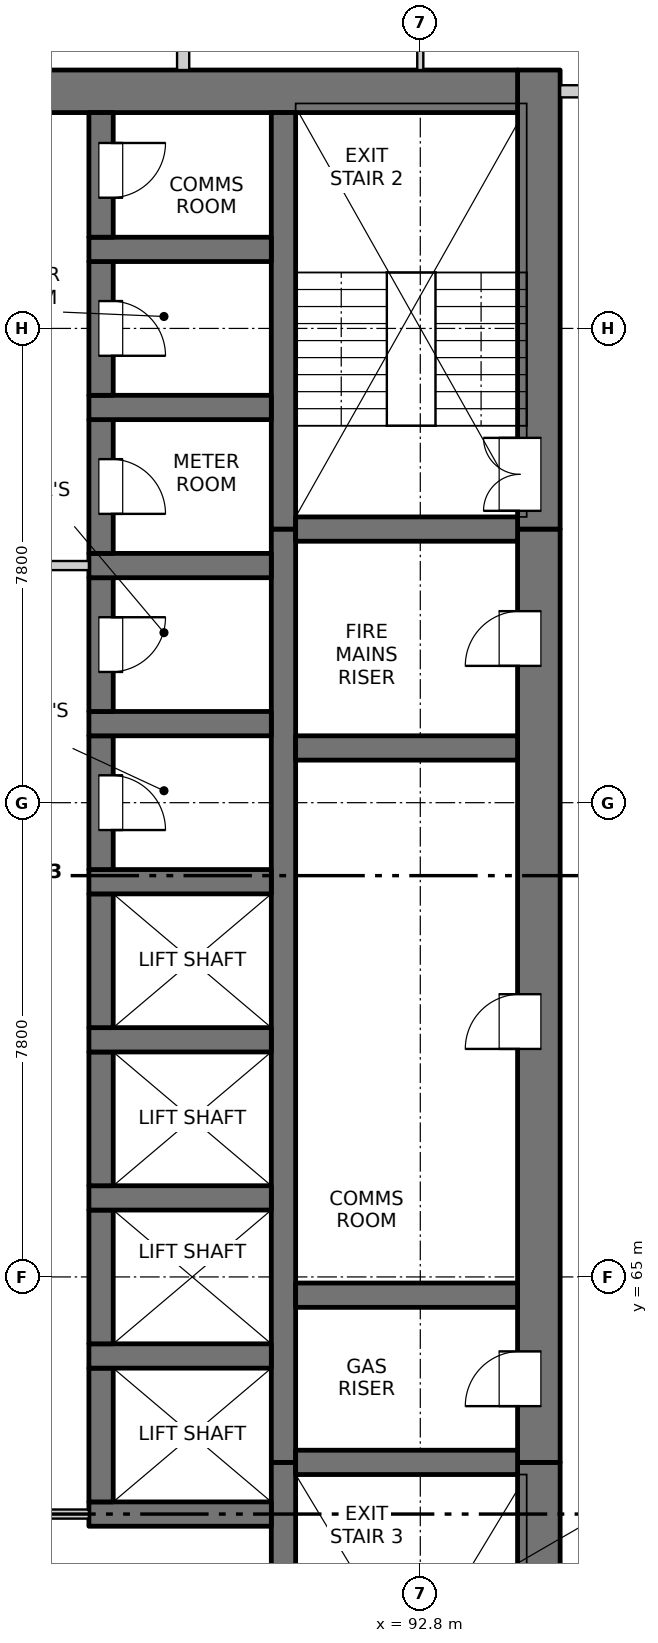
"""IFC4 building model, lengths in metres.
Left out: names, types, materials, properties, quantities, classifications, styles, units other than length and angle.
Written with IfcOpenShell. Run it as: python <this file> out.ifc"""

import sys

from ifc_helpers import new_model, si_unit, direction, frame, frame_2d, origin, place, context, subcontext, project, spatial, rectangle, extrude, element, fill, save


model = new_model("IFC4")
c1 = context("Model", 3, precision=1e-05, world=origin(), true_north=direction((0.0, 1.0)))
c2 = subcontext(c1, "Body", "Model", "MODEL_VIEW")
j1 = project(units=[si_unit("LENGTHUNIT", "METRE"), si_unit("PLANEANGLEUNIT", "RADIAN")], contexts=[c1])
p1 = place(None, origin())
s1 = spatial("IfcSite", under=j1, at=p1, CompositionType="ELEMENT")
p2 = place(p1, origin())
s2 = spatial("IfcBuilding", under=s1, at=p2, CompositionType="ELEMENT")
p3 = place(p2, frame((0.0, 0.0, 19.5)))
s3 = spatial("IfcBuildingStorey", under=s2, at=p3, CompositionType="ELEMENT", Elevation=19.5)
p4 = place(p3, frame((94.75, 54.9, -0.25), z_axis=(0.0, 0.0, 1.0), x_axis=(0.0, 1.0, 0.0)))
e1 = element("IfcWall", 1, at=p4, inside=s3, PredefinedType="SOLIDWALL", context=c2, shape_type="SweptSolid", body=[
    extrude(rectangle(XDim=7.05, YDim=0.7, at=frame_2d((3.525, 0.0))), origin(), (0.0, 0.0, 1.0), 3.4),
])
p5 = place(p4, frame((0.75, 0.0, 0.25)))
e2 = element("IfcOpeningElement", 2, at=p5, cuts=e1, PredefinedType="OPENING", context=c2, shape_type="SweptSolid", body=[
    extrude(rectangle(XDim=1.2, YDim=2.1, at=frame_2d((0.6, 1.05))), frame((0.0, 0.36, 0.0), z_axis=(0.0, -1.0, 0.0), x_axis=(1.0, 0.0, 0.0)), (0.0, 0.0, 1.0), 0.72),
])
p6 = place(p3, frame((94.75, 61.95, -0.25), z_axis=(0.0, 0.0, 1.0), x_axis=(0.0, 1.0, 0.0)))
e3 = element("IfcWall", 3, at=p6, inside=s3, PredefinedType="SOLIDWALL", context=c2, shape_type="SweptSolid", body=[
    extrude(rectangle(XDim=15.35, YDim=0.7, at=frame_2d((7.675, 0.0))), origin(), (0.0, 0.0, 1.0), 3.4),
])
p7 = place(p6, frame((0.925, 0.0, 0.25)))
e4 = element("IfcOpeningElement", 4, at=p7, cuts=e3, PredefinedType="OPENING", context=c2, shape_type="SweptSolid", body=[
    extrude(rectangle(XDim=0.9, YDim=2.1, at=frame_2d((0.45, 1.05))), frame((0.0, 0.36, 0.0), z_axis=(0.0, -1.0, 0.0), x_axis=(1.0, 0.0, 0.0)), (0.0, 0.0, 1.0), 0.72),
])
p8 = place(p6, frame((6.8, 0.0, 0.25)))
e5 = element("IfcOpeningElement", 5, at=p8, cuts=e3, PredefinedType="OPENING", context=c2, shape_type="SweptSolid", body=[
    extrude(rectangle(XDim=0.9, YDim=2.1, at=frame_2d((0.45, 1.05))), frame((0.0, 0.36, 0.0), z_axis=(0.0, -1.0, 0.0), x_axis=(1.0, 0.0, 0.0)), (0.0, 0.0, 1.0), 0.72),
])
p9 = place(p6, frame((13.1, 0.0, 0.25)))
e6 = element("IfcOpeningElement", 6, at=p9, cuts=e3, PredefinedType="OPENING", context=c2, shape_type="SweptSolid", body=[
    extrude(rectangle(XDim=0.9, YDim=2.1, at=frame_2d((0.45, 1.05))), frame((0.0, 0.36, 0.0), z_axis=(0.0, -1.0, 0.0), x_axis=(1.0, 0.0, 0.0)), (0.0, 0.0, 1.0), 0.72),
])
p10 = place(p3, frame((94.75, 77.3, -0.25), z_axis=(0.0, 0.0, 1.0), x_axis=(0.0, 1.0, 0.0)))
e7 = element("IfcWall", 7, at=p10, inside=s3, PredefinedType="SOLIDWALL", context=c2, shape_type="SweptSolid", body=[
    extrude(rectangle(XDim=7.55, YDim=0.7, at=frame_2d((3.775, 0.0))), origin(), (0.0, 0.0, 1.0), 3.4),
])
p11 = place(p10, frame((0.3, 0.0, 0.25)))
e8 = element("IfcOpeningElement", 8, at=p11, cuts=e7, PredefinedType="OPENING", context=c2, shape_type="SweptSolid", body=[
    extrude(rectangle(XDim=1.2, YDim=2.1, at=frame_2d((0.6, 1.05))), frame((0.0, 0.36, 0.0), z_axis=(0.0, -1.0, 0.0), x_axis=(1.0, 0.0, 0.0)), (0.0, 0.0, 1.0), 0.72),
])
p12 = place(p3, frame((75.6, 84.5, -0.25), z_axis=(0.0, 0.0, 1.0), x_axis=(1.0, 0.0, 0.0)))
e9 = element("IfcWall", 9, at=p12, inside=s3, PredefinedType="SOLIDWALL", context=c2, shape_type="SweptSolid", body=[
    extrude(rectangle(XDim=18.8, YDim=0.7, at=frame_2d((9.4, 0.0))), origin(), (0.0, 0.0, 1.0), 3.4),
])
p13 = place(p3, frame((90.55, 55.6, -0.25), z_axis=(0.0, 0.0, 1.0), x_axis=(0.0, 1.0, 0.0)))
e10 = element("IfcWall", 10, at=p13, inside=s3, PredefinedType="SOLIDWALL", context=c2, shape_type="SweptSolid", body=[
    extrude(rectangle(XDim=6.35, YDim=0.4, at=frame_2d((3.175, 0.0))), origin(), (0.0, 0.0, 1.0), 3.4),
])
p14 = place(p3, frame((90.55, 61.95, -0.25), z_axis=(0.0, 0.0, 1.0), x_axis=(0.0, 1.0, 0.0)))
e11 = element("IfcWall", 11, at=p14, inside=s3, PredefinedType="SOLIDWALL", context=c2, shape_type="SweptSolid", body=[
    extrude(rectangle(XDim=15.35, YDim=0.4, at=frame_2d((7.675, 0.0))), origin(), (0.0, 0.0, 1.0), 3.4),
])
p15 = place(p3, frame((90.55, 77.3, -0.25), z_axis=(0.0, 0.0, 1.0), x_axis=(0.0, 1.0, 0.0)))
e12 = element("IfcWall", 12, at=p15, inside=s3, PredefinedType="SOLIDWALL", context=c2, shape_type="SweptSolid", body=[
    extrude(rectangle(XDim=6.85, YDim=0.4, at=frame_2d((3.425, 0.0))), origin(), (0.0, 0.0, 1.0), 3.4),
])
p16 = place(p3, frame((87.35, 61.1, -0.25), z_axis=(0.0, 0.0, 1.0), x_axis=(1.0, 0.0, 0.0)))
e13 = element("IfcWall", 13, at=p16, inside=s3, PredefinedType="SOLIDWALL", context=c2, shape_type="SweptSolid", body=[
    extrude(rectangle(XDim=3.0, YDim=0.4, at=frame_2d((1.5, 0.0))), origin(), (0.0, 0.0, 1.0), 3.4),
])
p17 = place(p3, frame((87.55, 61.3, -0.25), z_axis=(0.0, 0.0, 1.0), x_axis=(0.0, 1.0, 0.0)))
e14 = element("IfcWall", 14, at=p17, inside=s3, PredefinedType="SOLIDWALL", context=c2, shape_type="SweptSolid", body=[
    extrude(rectangle(XDim=2.2, YDim=0.4, at=frame_2d((1.1, 0.0))), origin(), (0.0, 0.0, 1.0), 3.4),
])
p18 = place(p3, frame((87.35, 63.7, -0.25), z_axis=(0.0, 0.0, 1.0), x_axis=(1.0, 0.0, 0.0)))
e15 = element("IfcWall", 15, at=p18, inside=s3, PredefinedType="SOLIDWALL", context=c2, shape_type="SweptSolid", body=[
    extrude(rectangle(XDim=3.0, YDim=0.4, at=frame_2d((1.5, 0.0))), origin(), (0.0, 0.0, 1.0), 3.4),
])
p19 = place(p3, frame((87.55, 63.9, -0.25), z_axis=(0.0, 0.0, 1.0), x_axis=(0.0, 1.0, 0.0)))
e16 = element("IfcWall", 16, at=p19, inside=s3, PredefinedType="SOLIDWALL", context=c2, shape_type="SweptSolid", body=[
    extrude(rectangle(XDim=2.2, YDim=0.4, at=frame_2d((1.1, 0.0))), origin(), (0.0, 0.0, 1.0), 3.4),
])
p20 = place(p3, frame((87.35, 66.3, -0.25), z_axis=(0.0, 0.0, 1.0), x_axis=(1.0, 0.0, 0.0)))
e17 = element("IfcWall", 17, at=p20, inside=s3, PredefinedType="SOLIDWALL", context=c2, shape_type="SweptSolid", body=[
    extrude(rectangle(XDim=3.0, YDim=0.4, at=frame_2d((1.5, 0.0))), origin(), (0.0, 0.0, 1.0), 3.4),
])
p21 = place(p3, frame((87.55, 66.5, -0.25), z_axis=(0.0, 0.0, 1.0), x_axis=(0.0, 1.0, 0.0)))
e18 = element("IfcWall", 18, at=p21, inside=s3, PredefinedType="SOLIDWALL", context=c2, shape_type="SweptSolid", body=[
    extrude(rectangle(XDim=2.2, YDim=0.4, at=frame_2d((1.1, 0.0))), origin(), (0.0, 0.0, 1.0), 3.4),
])
p22 = place(p3, frame((87.35, 68.9, -0.25), z_axis=(0.0, 0.0, 1.0), x_axis=(1.0, 0.0, 0.0)))
e19 = element("IfcWall", 19, at=p22, inside=s3, PredefinedType="SOLIDWALL", context=c2, shape_type="SweptSolid", body=[
    extrude(rectangle(XDim=3.0, YDim=0.4, at=frame_2d((1.5, 0.0))), origin(), (0.0, 0.0, 1.0), 3.4),
])
p23 = place(p3, frame((87.55, 69.1, -0.25), z_axis=(0.0, 0.0, 1.0), x_axis=(0.0, 1.0, 0.0)))
e20 = element("IfcWall", 20, at=p23, inside=s3, PredefinedType="SOLIDWALL", context=c2, shape_type="SweptSolid", body=[
    extrude(rectangle(XDim=2.2, YDim=0.4, at=frame_2d((1.1, 0.0))), origin(), (0.0, 0.0, 1.0), 3.4),
])
p24 = place(p3, frame((87.35, 71.5, -0.25), z_axis=(0.0, 0.0, 1.0), x_axis=(1.0, 0.0, 0.0)))
e21 = element("IfcWall", 21, at=p24, inside=s3, PredefinedType="SOLIDWALL", context=c2, shape_type="SweptSolid", body=[
    extrude(rectangle(XDim=3.0, YDim=0.4, at=frame_2d((1.5, 0.0))), origin(), (0.0, 0.0, 1.0), 3.4),
])
p25 = place(p3, frame((87.55, 71.7, -0.25), z_axis=(0.0, 0.0, 1.0), x_axis=(0.0, 1.0, 0.0)))
e22 = element("IfcWall", 22, at=p25, inside=s3, PredefinedType="SOLIDWALL", context=c2, shape_type="SweptSolid", body=[
    extrude(rectangle(XDim=2.2, YDim=0.4, at=frame_2d((1.1, 0.0))), origin(), (0.0, 0.0, 1.0), 3.4),
])
p26 = place(p25, frame((0.65, 0.0, 0.25)))
e23 = element("IfcOpeningElement", 23, at=p26, cuts=e22, PredefinedType="OPENING", context=c2, shape_type="SweptSolid", body=[
    extrude(rectangle(XDim=0.9, YDim=2.1, at=frame_2d((0.45, 1.05))), frame((0.0, 0.21, 0.0), z_axis=(0.0, -1.0, 0.0), x_axis=(1.0, 0.0, 0.0)), (0.0, 0.0, 1.0), 0.42),
])
p27 = place(p3, frame((87.35, 74.1, -0.25), z_axis=(0.0, 0.0, 1.0), x_axis=(1.0, 0.0, 0.0)))
e24 = element("IfcWall", 24, at=p27, inside=s3, PredefinedType="SOLIDWALL", context=c2, shape_type="SweptSolid", body=[
    extrude(rectangle(XDim=3.0, YDim=0.4, at=frame_2d((1.5, 0.0))), origin(), (0.0, 0.0, 1.0), 3.4),
])
p28 = place(p3, frame((87.55, 74.3, -0.25), z_axis=(0.0, 0.0, 1.0), x_axis=(0.0, 1.0, 0.0)))
e25 = element("IfcWall", 25, at=p28, inside=s3, PredefinedType="SOLIDWALL", context=c2, shape_type="SweptSolid", body=[
    extrude(rectangle(XDim=2.2, YDim=0.4, at=frame_2d((1.1, 0.0))), origin(), (0.0, 0.0, 1.0), 3.4),
])
p29 = place(p28, frame((0.65, 0.0, 0.25)))
e26 = element("IfcOpeningElement", 26, at=p29, cuts=e25, PredefinedType="OPENING", context=c2, shape_type="SweptSolid", body=[
    extrude(rectangle(XDim=0.9, YDim=2.1, at=frame_2d((0.45, 1.05))), frame((0.0, 0.21, 0.0), z_axis=(0.0, -1.0, 0.0), x_axis=(1.0, 0.0, 0.0)), (0.0, 0.0, 1.0), 0.42),
])
p30 = place(p3, frame((87.35, 76.7, -0.25), z_axis=(0.0, 0.0, 1.0), x_axis=(1.0, 0.0, 0.0)))
e27 = element("IfcWall", 27, at=p30, inside=s3, PredefinedType="SOLIDWALL", context=c2, shape_type="SweptSolid", body=[
    extrude(rectangle(XDim=3.0, YDim=0.4, at=frame_2d((1.5, 0.0))), origin(), (0.0, 0.0, 1.0), 3.4),
])
p31 = place(p3, frame((87.55, 76.9, -0.25), z_axis=(0.0, 0.0, 1.0), x_axis=(0.0, 1.0, 0.0)))
e28 = element("IfcWall", 28, at=p31, inside=s3, PredefinedType="SOLIDWALL", context=c2, shape_type="SweptSolid", body=[
    extrude(rectangle(XDim=2.2, YDim=0.4, at=frame_2d((1.1, 0.0))), origin(), (0.0, 0.0, 1.0), 3.4),
])
p32 = place(p31, frame((0.65, 0.0, 0.25)))
e29 = element("IfcOpeningElement", 29, at=p32, cuts=e28, PredefinedType="OPENING", context=c2, shape_type="SweptSolid", body=[
    extrude(rectangle(XDim=0.9, YDim=2.1, at=frame_2d((0.45, 1.05))), frame((0.0, 0.21, 0.0), z_axis=(0.0, -1.0, 0.0), x_axis=(1.0, 0.0, 0.0)), (0.0, 0.0, 1.0), 0.42),
])
p33 = place(p3, frame((87.35, 79.3, -0.25), z_axis=(0.0, 0.0, 1.0), x_axis=(1.0, 0.0, 0.0)))
e30 = element("IfcWall", 30, at=p33, inside=s3, PredefinedType="SOLIDWALL", context=c2, shape_type="SweptSolid", body=[
    extrude(rectangle(XDim=3.0, YDim=0.4, at=frame_2d((1.5, 0.0))), origin(), (0.0, 0.0, 1.0), 3.4),
])
p34 = place(p3, frame((87.55, 79.5, -0.25), z_axis=(0.0, 0.0, 1.0), x_axis=(0.0, 1.0, 0.0)))
e31 = element("IfcWall", 31, at=p34, inside=s3, PredefinedType="SOLIDWALL", context=c2, shape_type="SweptSolid", body=[
    extrude(rectangle(XDim=2.2, YDim=0.4, at=frame_2d((1.1, 0.0))), origin(), (0.0, 0.0, 1.0), 3.4),
])
p35 = place(p34, frame((0.65, 0.0, 0.25)))
e32 = element("IfcOpeningElement", 32, at=p35, cuts=e31, PredefinedType="OPENING", context=c2, shape_type="SweptSolid", body=[
    extrude(rectangle(XDim=0.9, YDim=2.1, at=frame_2d((0.45, 1.05))), frame((0.0, 0.21, 0.0), z_axis=(0.0, -1.0, 0.0), x_axis=(1.0, 0.0, 0.0)), (0.0, 0.0, 1.0), 0.42),
])
p36 = place(p3, frame((87.35, 81.9, -0.25), z_axis=(0.0, 0.0, 1.0), x_axis=(1.0, 0.0, 0.0)))
e33 = element("IfcWall", 33, at=p36, inside=s3, PredefinedType="SOLIDWALL", context=c2, shape_type="SweptSolid", body=[
    extrude(rectangle(XDim=3.0, YDim=0.4, at=frame_2d((1.5, 0.0))), origin(), (0.0, 0.0, 1.0), 3.4),
])
p37 = place(p3, frame((87.55, 82.1, -0.25), z_axis=(0.0, 0.0, 1.0), x_axis=(0.0, 1.0, 0.0)))
e34 = element("IfcWall", 34, at=p37, inside=s3, PredefinedType="SOLIDWALL", context=c2, shape_type="SweptSolid", body=[
    extrude(rectangle(XDim=2.05, YDim=0.4, at=frame_2d((1.025, 0.0))), origin(), (0.0, 0.0, 1.0), 3.4),
])
p38 = place(p37, frame((0.65, 0.0, 0.25)))
e35 = element("IfcOpeningElement", 35, at=p38, cuts=e34, PredefinedType="OPENING", context=c2, shape_type="SweptSolid", body=[
    extrude(rectangle(XDim=0.9, YDim=2.1, at=frame_2d((0.45, 1.05))), frame((0.0, 0.21, 0.0), z_axis=(0.0, -1.0, 0.0), x_axis=(1.0, 0.0, 0.0)), (0.0, 0.0, 1.0), 0.42),
])
for number, where, z_axis, x_axis in (
    (36, (90.75, 61.95, -0.25), (0.0, 0.0, 1.0), (1.0, 0.0, 0.0)),
    (37, (90.75, 64.7, -0.25), (0.0, 0.0, 1.0), (1.0, 0.0, 0.0)),
    (38, (90.75, 73.7, -0.25), (0.0, 0.0, 1.0), (1.0, 0.0, 0.0)),
    (39, (90.75, 77.3, -0.25), (0.0, 0.0, 1.0), (1.0, 0.0, 0.0)),
):
    element("IfcWall", number, at=place(p3, frame(where, z_axis=z_axis, x_axis=x_axis)), inside=s3, PredefinedType="SOLIDWALL", context=c2, shape_type="SweptSolid", body=[
        extrude(rectangle(XDim=3.65, YDim=0.4, at=frame_2d((1.825, 0.0))), origin(), (0.0, 0.0, 1.0), 3.4),
    ])
p39 = place(p3, frame((82.65, 61.1, 0.0), z_axis=(0.0, 0.0, 1.0), x_axis=(1.0, 0.0, 0.0)))
e40 = element("IfcWall", 40, at=p39, inside=s3, PredefinedType="PARTITIONING", context=c2, shape_type="SweptSolid", body=[
    extrude(rectangle(XDim=4.7, YDim=0.15, at=frame_2d((2.35, 0.0))), origin(), (0.0, 0.0, 1.0), 3.15),
])
p40 = place(p39, frame((1.45, 0.0, 0.0)))
e41 = element("IfcOpeningElement", 41, at=p40, cuts=e40, PredefinedType="OPENING", context=c2, shape_type="SweptSolid", body=[
    extrude(rectangle(XDim=1.8, YDim=2.1, at=frame_2d((0.9, 1.05))), frame((0.0, 0.085, 0.0), z_axis=(0.0, -1.0, 0.0), x_axis=(1.0, 0.0, 0.0)), (0.0, 0.0, 1.0), 0.17),
])
p41 = place(p3, frame((82.65, 76.7, 0.0), z_axis=(0.0, 0.0, 1.0), x_axis=(1.0, 0.0, 0.0)))
e42 = element("IfcWall", 42, at=p41, inside=s3, PredefinedType="PARTITIONING", context=c2, shape_type="SweptSolid", body=[
    extrude(rectangle(XDim=4.7, YDim=0.15, at=frame_2d((2.35, 0.0))), origin(), (0.0, 0.0, 1.0), 3.15),
])
p42 = place(p41, frame((1.45, 0.0, 0.0)))
e43 = element("IfcOpeningElement", 43, at=p42, cuts=e42, PredefinedType="OPENING", context=c2, shape_type="SweptSolid", body=[
    extrude(rectangle(XDim=1.8, YDim=2.1, at=frame_2d((0.9, 1.05))), frame((0.0, 0.085, 0.0), z_axis=(0.0, -1.0, 0.0), x_axis=(1.0, 0.0, 0.0)), (0.0, 0.0, 1.0), 0.17),
])
p43 = place(p3, frame((95.1, 84.5, 0.0), z_axis=(0.0, 0.0, 1.0), x_axis=(1.0, 0.0, 0.0)))
e44 = element("IfcWall", 44, at=p43, inside=s3, PredefinedType="PARTITIONING", context=c2, shape_type="SweptSolid", body=[
    extrude(rectangle(XDim=1.7, YDim=0.2, at=frame_2d((0.85, 0.0))), origin(), (0.0, 0.0, 1.0), 3.15),
])
p44 = place(p3, frame((88.9, 84.85, 0.0), z_axis=(0.0, 0.0, 1.0), x_axis=(0.0, 1.0, 0.0)))
e45 = element("IfcWall", 45, at=p44, inside=s3, PredefinedType="PARTITIONING", context=c2, shape_type="SweptSolid", body=[
    extrude(rectangle(XDim=3.25, YDim=0.2, at=frame_2d((1.625, 0.0))), origin(), (0.0, 0.0, 1.0), 3.15),
])
p45 = place(p3, frame((92.8, 84.85, 0.0), z_axis=(0.0, 0.0, 1.0), x_axis=(0.0, 1.0, 0.0)))
e46 = element("IfcWall", 46, at=p45, inside=s3, PredefinedType="PARTITIONING", context=c2, shape_type="SweptSolid", body=[
    extrude(rectangle(XDim=3.25, YDim=0.1, at=frame_2d((1.625, 0.0))), origin(), (0.0, 0.0, 1.0), 3.15),
])
p46 = place(p45, frame((1.15, 0.0, 0.0)))
e47 = element("IfcOpeningElement", 47, at=p46, cuts=e46, PredefinedType="OPENING", context=c2, shape_type="SweptSolid", body=[
    extrude(rectangle(XDim=0.9, YDim=2.1, at=frame_2d((0.45, 1.05))), frame((0.0, 0.06, 0.0), z_axis=(0.0, -1.0, 0.0), x_axis=(1.0, 0.0, 0.0)), (0.0, 0.0, 1.0), 0.12),
])
p47 = place(p7, origin())
e48 = element("IfcDoor", 48, at=p47, inside=s3, OperationType="SINGLE_SWING_LEFT", PredefinedType="DOOR", context=c2, shape_type="SweptSolid", body=[
    extrude(rectangle(XDim=0.9, YDim=2.1, at=frame_2d((0.45, 1.05))), frame((0.0, 0.335, 0.0), z_axis=(0.0, -1.0, 0.0), x_axis=(1.0, 0.0, 0.0)), (0.0, 0.0, 1.0), 0.05),
])
fill(e4, e48)
p48 = place(p8, origin())
e49 = element("IfcDoor", 49, at=p48, inside=s3, OperationType="SINGLE_SWING_LEFT", PredefinedType="DOOR", context=c2, shape_type="SweptSolid", body=[
    extrude(rectangle(XDim=0.9, YDim=2.1, at=frame_2d((0.45, 1.05))), frame((0.0, 0.335, 0.0), z_axis=(0.0, -1.0, 0.0), x_axis=(1.0, 0.0, 0.0)), (0.0, 0.0, 1.0), 0.05),
])
fill(e5, e49)
p49 = place(p26, origin())
e50 = element("IfcDoor", 50, at=p49, inside=s3, OperationType="SINGLE_SWING_RIGHT", PredefinedType="DOOR", context=c2, shape_type="SweptSolid", body=[
    extrude(rectangle(XDim=0.9, YDim=2.1, at=frame_2d((0.45, 1.05))), frame((0.0, -0.135, 0.0), z_axis=(0.0, -1.0, 0.0), x_axis=(1.0, 0.0, 0.0)), (0.0, 0.0, 1.0), 0.05),
])
fill(e23, e50)
p50 = place(p29, origin())
e51 = element("IfcDoor", 51, at=p50, inside=s3, OperationType="SINGLE_SWING_LEFT", PredefinedType="DOOR", context=c2, shape_type="SweptSolid", body=[
    extrude(rectangle(XDim=0.9, YDim=2.1, at=frame_2d((0.45, 1.05))), frame((0.0, -0.135, 0.0), z_axis=(0.0, -1.0, 0.0), x_axis=(1.0, 0.0, 0.0)), (0.0, 0.0, 1.0), 0.05),
])
fill(e26, e51)
p51 = place(p9, origin())
e52 = element("IfcDoor", 52, at=p51, inside=s3, OperationType="SINGLE_SWING_LEFT", PredefinedType="DOOR", context=c2, shape_type="SweptSolid", body=[
    extrude(rectangle(XDim=0.9, YDim=2.1, at=frame_2d((0.45, 1.05))), frame((0.0, 0.335, 0.0), z_axis=(0.0, -1.0, 0.0), x_axis=(1.0, 0.0, 0.0)), (0.0, 0.0, 1.0), 0.05),
])
fill(e6, e52)
p52 = place(p32, origin())
e53 = element("IfcDoor", 53, at=p52, inside=s3, OperationType="SINGLE_SWING_RIGHT", PredefinedType="DOOR", context=c2, shape_type="SweptSolid", body=[
    extrude(rectangle(XDim=0.9, YDim=2.1, at=frame_2d((0.45, 1.05))), frame((0.0, -0.135, 0.0), z_axis=(0.0, -1.0, 0.0), x_axis=(1.0, 0.0, 0.0)), (0.0, 0.0, 1.0), 0.05),
])
fill(e29, e53)
p53 = place(p11, origin())
e54 = element("IfcDoor", 54, at=p53, inside=s3, OperationType="DOUBLE_DOOR_SINGLE_SWING", PredefinedType="DOOR", context=c2, shape_type="SweptSolid", body=[
    extrude(rectangle(XDim=1.2, YDim=2.1, at=frame_2d((0.6, 1.05))), frame((0.0, 0.335, 0.0), z_axis=(0.0, -1.0, 0.0), x_axis=(1.0, 0.0, 0.0)), (0.0, 0.0, 1.0), 0.05),
])
fill(e8, e54)
p54 = place(p35, origin())
e55 = element("IfcDoor", 55, at=p54, inside=s3, OperationType="SINGLE_SWING_RIGHT", PredefinedType="DOOR", context=c2, shape_type="SweptSolid", body=[
    extrude(rectangle(XDim=0.9, YDim=2.1, at=frame_2d((0.45, 1.05))), frame((0.0, -0.135, 0.0), z_axis=(0.0, -1.0, 0.0), x_axis=(1.0, 0.0, 0.0)), (0.0, 0.0, 1.0), 0.05),
])
fill(e32, e55)
p55 = place(p38, origin())
e56 = element("IfcDoor", 56, at=p55, inside=s3, OperationType="SINGLE_SWING_LEFT", PredefinedType="DOOR", context=c2, shape_type="SweptSolid", body=[
    extrude(rectangle(XDim=0.9, YDim=2.1, at=frame_2d((0.45, 1.05))), frame((0.0, -0.135, 0.0), z_axis=(0.0, -1.0, 0.0), x_axis=(1.0, 0.0, 0.0)), (0.0, 0.0, 1.0), 0.05),
])
fill(e35, e56)
save(model, sys.argv[1])
